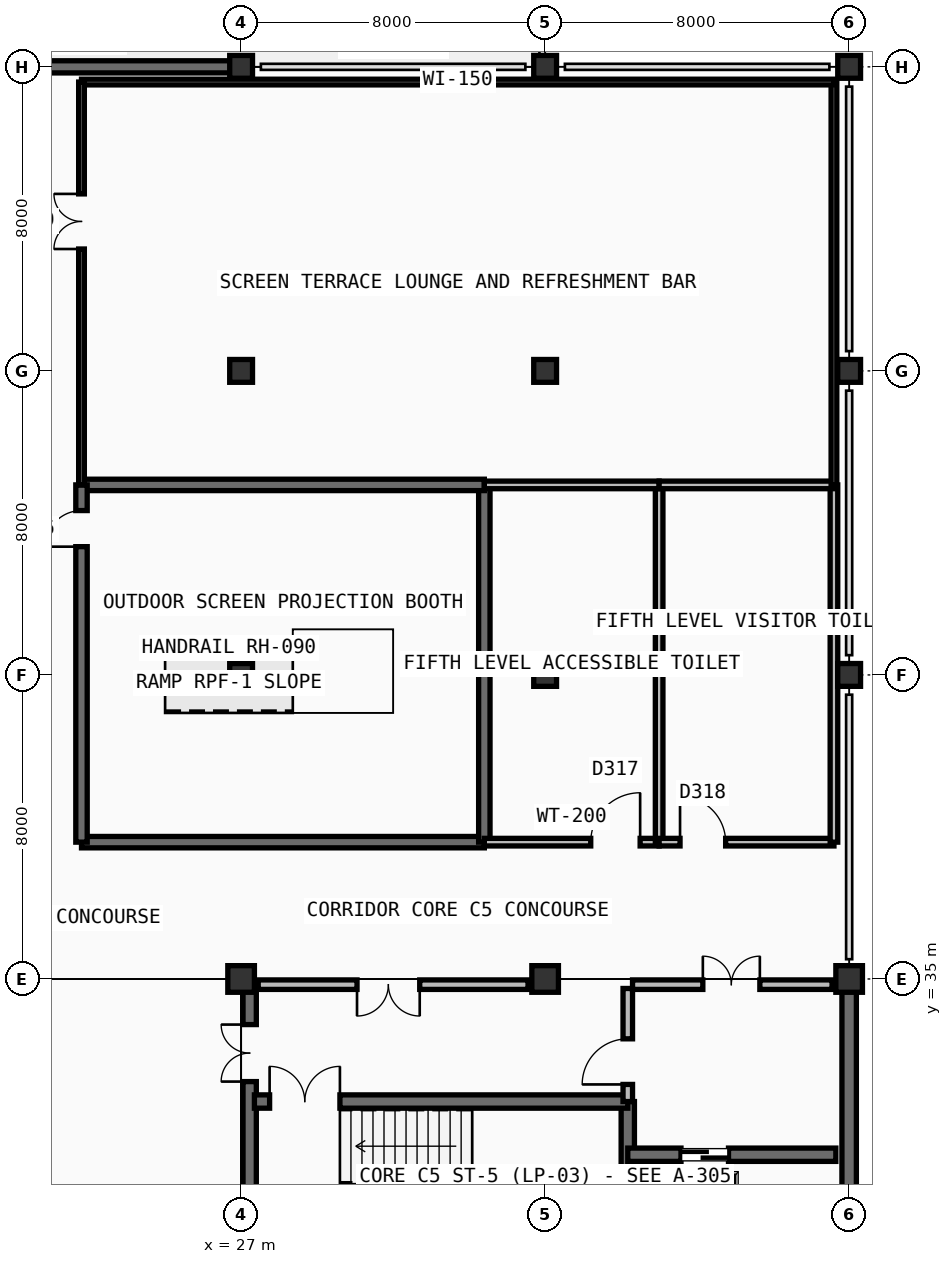
"""IFC4 building model, lengths in metres.
Left out: names, types, materials, properties, quantities, classifications, styles, units other than length and angle.
Written with IfcOpenShell. Run it as: python <this file> out.ifc"""

import sys

from ifc_helpers import new_model, si_unit, direction, frame, frame_2d, origin, origin_2d, place, context, subcontext, project, spatial, rectangle, extrude, element, fill, save


model = new_model("IFC4")
c1 = context("Model", 3, precision=1e-05, world=origin(), true_north=direction((0.0, 1.0)))
c2 = subcontext(c1, "Body", "Model", "MODEL_VIEW")
j1 = project(units=[si_unit("LENGTHUNIT", "METRE"), si_unit("PLANEANGLEUNIT", "RADIAN")], contexts=[c1])
p1 = place(None, origin())
s1 = spatial("IfcSite", under=j1, at=p1, CompositionType="ELEMENT")
p2 = place(p1, origin())
s2 = spatial("IfcBuilding", under=s1, at=p2, CompositionType="ELEMENT")
p3 = place(p2, frame((0.0, 0.0, 23.4)))
s3 = spatial("IfcBuildingStorey", under=s2, at=p3, CompositionType="ELEMENT", Elevation=23.4)
p4 = place(p3, frame((27.0, 35.0, 0.0), z_axis=(0.0, 0.0, 1.0), x_axis=(1.0, 0.0, 0.0)))
e1 = element("IfcColumn", 1, at=p4, inside=s3, PredefinedType="COLUMN", context=c2, shape_type="SweptSolid", body=[
    extrude(rectangle(XDim=0.7, YDim=0.7, at=origin_2d()), origin(), (0.0, 0.0, 1.0), 4.5),
])
for number, where, z_axis, x_axis in (
    (2, (27.0, 43.0, 0.0), (0.0, 0.0, 1.0), (1.0, 0.0, 0.0)),
    (3, (27.0, 51.0, 0.0), (0.0, 0.0, 1.0), (1.0, 0.0, 0.0)),
    (4, (27.0, 59.0, 0.0), (0.0, 0.0, 1.0), (1.0, 0.0, 0.0)),
):
    element("IfcColumn", number, at=place(p3, frame(where, z_axis=z_axis, x_axis=x_axis)), inside=s3, PredefinedType="COLUMN", context=c2, shape_type="SweptSolid", body=[
        extrude(rectangle(XDim=0.6, YDim=0.6, at=origin_2d()), origin(), (0.0, 0.0, 1.0), 4.5),
    ])
p5 = place(p3, frame((35.0, 35.0, 0.0), z_axis=(0.0, 0.0, 1.0), x_axis=(1.0, 0.0, 0.0)))
e5 = element("IfcColumn", 5, at=p5, inside=s3, PredefinedType="COLUMN", context=c2, shape_type="SweptSolid", body=[
    extrude(rectangle(XDim=0.7, YDim=0.7, at=origin_2d()), origin(), (0.0, 0.0, 1.0), 4.5),
])
for number, where, z_axis, x_axis in (
    (6, (35.0, 43.0, 0.0), (0.0, 0.0, 1.0), (1.0, 0.0, 0.0)),
    (7, (35.0, 51.0, 0.0), (0.0, 0.0, 1.0), (1.0, 0.0, 0.0)),
    (8, (35.0, 59.0, 0.0), (0.0, 0.0, 1.0), (1.0, 0.0, 0.0)),
):
    element("IfcColumn", number, at=place(p3, frame(where, z_axis=z_axis, x_axis=x_axis)), inside=s3, PredefinedType="COLUMN", context=c2, shape_type="SweptSolid", body=[
        extrude(rectangle(XDim=0.6, YDim=0.6, at=origin_2d()), origin(), (0.0, 0.0, 1.0), 4.5),
    ])
p6 = place(p3, frame((43.0, 35.0, 0.0), z_axis=(0.0, 0.0, 1.0), x_axis=(1.0, 0.0, 0.0)))
e9 = element("IfcColumn", 9, at=p6, inside=s3, PredefinedType="COLUMN", context=c2, shape_type="SweptSolid", body=[
    extrude(rectangle(XDim=0.7, YDim=0.7, at=origin_2d()), origin(), (0.0, 0.0, 1.0), 4.5),
])
for number, where, z_axis, x_axis in (
    (10, (43.0, 43.0, 0.0), (0.0, 0.0, 1.0), (1.0, 0.0, 0.0)),
    (11, (43.0, 51.0, 0.0), (0.0, 0.0, 1.0), (1.0, 0.0, 0.0)),
    (12, (43.0, 59.0, 0.0), (0.0, 0.0, 1.0), (1.0, 0.0, 0.0)),
):
    element("IfcColumn", number, at=place(p3, frame(where, z_axis=z_axis, x_axis=x_axis)), inside=s3, PredefinedType="COLUMN", context=c2, shape_type="SweptSolid", body=[
        extrude(rectangle(XDim=0.6, YDim=0.6, at=origin_2d()), origin(), (0.0, 0.0, 1.0), 4.5),
    ])
p7 = place(p3, frame((19.0, 59.0, 0.0), z_axis=(0.0, 0.0, 1.0), x_axis=(1.0, 0.0, 0.0)))
e13 = element("IfcWall", 13, at=p7, inside=s3, PredefinedType="SOLIDWALL", context=c2, shape_type="SweptSolid", body=[
    extrude(rectangle(XDim=8.0, YDim=0.32, at=frame_2d((4.0, 0.0))), origin(), (0.0, 0.0, 1.0), 4.5),
])
p8 = place(p7, frame((1.1, 0.0, 0.0)))
e14 = element("IfcOpeningElement", 14, at=p8, cuts=e13, PredefinedType="OPENING", context=c2, shape_type="SweptSolid", body=[
    extrude(rectangle(XDim=1.8, YDim=2.3, at=frame_2d((0.9, 1.15))), frame((0.0, 0.17, 0.0), z_axis=(0.0, -1.0, 0.0), x_axis=(1.0, 0.0, 0.0)), (0.0, 0.0, 1.0), 0.34),
])
p9 = place(p3, frame((43.0, 35.0, 0.0), z_axis=(0.0, 0.0, 1.0), x_axis=(0.0, -1.0, 0.0)))
e15 = element("IfcWall", 15, at=p9, inside=s3, PredefinedType="SOLIDWALL", context=c2, shape_type="SweptSolid", body=[
    extrude(rectangle(XDim=8.0, YDim=0.38, at=frame_2d((4.0, 0.0))), origin(), (0.0, 0.0, 1.0), 4.5),
])
p10 = place(p3, frame((27.225, 27.2, 0.0), z_axis=(0.0, 0.0, 1.0), x_axis=(0.0, 1.0, 0.0)))
e16 = element("IfcWall", 16, at=p10, inside=s3, PredefinedType="SHEAR", context=c2, shape_type="SweptSolid", body=[
    extrude(rectangle(XDim=7.6, YDim=0.35, at=frame_2d((3.8, 0.0))), origin(), (0.0, 0.0, 1.0), 4.1),
])
p11 = place(p10, frame((5.1, 0.0, 0.0)))
e17 = element("IfcOpeningElement", 17, at=p11, cuts=e16, PredefinedType="OPENING", context=c2, shape_type="SweptSolid", body=[
    extrude(rectangle(XDim=1.5, YDim=2.2, at=frame_2d((0.75, 1.1))), frame((0.0, 0.185, 0.0), z_axis=(0.0, -1.0, 0.0), x_axis=(1.0, 0.0, 0.0)), (0.0, 0.0, 1.0), 0.37),
])
p12 = place(p3, frame((37.175, 27.35, 0.0), z_axis=(0.0, 0.0, 1.0), x_axis=(0.0, 1.0, 0.0)))
e18 = element("IfcWall", 18, at=p12, inside=s3, PredefinedType="SHEAR", context=c2, shape_type="SweptSolid", body=[
    extrude(rectangle(XDim=4.425, YDim=0.35, at=frame_2d((2.212, 0.0))), origin(), (0.0, 0.0, 1.0), 4.1),
])
p13 = place(p3, frame((27.35, 31.775, 0.0), z_axis=(0.0, 0.0, 1.0), x_axis=(1.0, 0.0, 0.0)))
e19 = element("IfcWall", 19, at=p13, inside=s3, PredefinedType="SHEAR", context=c2, shape_type="SweptSolid", body=[
    extrude(rectangle(XDim=9.825, YDim=0.35, at=frame_2d((4.913, 0.0))), origin(), (0.0, 0.0, 1.0), 4.1),
])
p14 = place(p13, frame((0.4, 0.0, 0.0)))
e20 = element("IfcOpeningElement", 20, at=p14, cuts=e19, PredefinedType="OPENING", context=c2, shape_type="SweptSolid", body=[
    extrude(rectangle(XDim=1.85, YDim=2.25, at=frame_2d((0.925, 1.125))), frame((0.0, 0.185, 0.0), z_axis=(0.0, -1.0, 0.0), x_axis=(1.0, 0.0, 0.0)), (0.0, 0.0, 1.0), 0.37),
])
p15 = place(p3, frame((37.175, 30.375, 0.0), z_axis=(0.0, 0.0, 1.0), x_axis=(1.0, 0.0, 0.0)))
e21 = element("IfcWall", 21, at=p15, inside=s3, PredefinedType="SHEAR", context=c2, shape_type="SweptSolid", body=[
    extrude(rectangle(XDim=5.475, YDim=0.35, at=frame_2d((2.737, 0.0))), origin(), (0.0, 0.0, 1.0), 4.1),
])
p16 = place(p15, frame((1.4, 0.0, 0.0)))
e22 = element("IfcOpeningElement", 22, at=p16, cuts=e21, PredefinedType="OPENING", context=c2, shape_type="SweptSolid", body=[
    extrude(rectangle(XDim=1.25, YDim=2.25, at=frame_2d((0.625, 1.125))), frame((0.0, 0.185, 0.0), z_axis=(0.0, -1.0, 0.0), x_axis=(1.0, 0.0, 0.0)), (0.0, 0.0, 1.0), 0.37),
])
p17 = place(p3, frame((37.175, 31.775, 0.0), z_axis=(0.0, 0.0, 1.0), x_axis=(0.0, 1.0, 0.0)))
e23 = element("IfcWall", 23, at=p17, inside=s3, PredefinedType="PARTITIONING", context=c2, shape_type="SweptSolid", body=[
    extrude(rectangle(XDim=2.975, YDim=0.25, at=frame_2d((1.488, 0.0))), origin(), (0.0, 0.0, 1.0), 4.1),
])
p18 = place(p17, frame((0.45, 0.0, 0.0)))
e24 = element("IfcOpeningElement", 24, at=p18, cuts=e23, PredefinedType="OPENING", context=c2, shape_type="SweptSolid", body=[
    extrude(rectangle(XDim=1.2, YDim=2.2, at=frame_2d((0.6, 1.1))), frame((0.0, 0.135, 0.0), z_axis=(0.0, -1.0, 0.0), x_axis=(1.0, 0.0, 0.0)), (0.0, 0.0, 1.0), 0.27),
])
p19 = place(p3, frame((27.45, 34.85, 0.0), z_axis=(0.0, 0.0, 1.0), x_axis=(1.0, 0.0, 0.0)))
e25 = element("IfcWall", 25, at=p19, inside=s3, PredefinedType="PARTITIONING", context=c2, shape_type="SweptSolid", body=[
    extrude(rectangle(XDim=7.1, YDim=0.25, at=frame_2d((3.55, 0.0))), origin(), (0.0, 0.0, 1.0), 3.435),
])
p20 = place(p19, frame((2.6, 0.0, 0.0)))
e26 = element("IfcOpeningElement", 26, at=p20, cuts=e25, PredefinedType="OPENING", context=c2, shape_type="SweptSolid", body=[
    extrude(rectangle(XDim=1.65, YDim=2.25, at=frame_2d((0.825, 1.125))), frame((0.0, 0.135, 0.0), z_axis=(0.0, -1.0, 0.0), x_axis=(1.0, 0.0, 0.0)), (0.0, 0.0, 1.0), 0.27),
])
p21 = place(p3, frame((37.3, 34.85, 0.0), z_axis=(0.0, 0.0, 1.0), x_axis=(1.0, 0.0, 0.0)))
e27 = element("IfcWall", 27, at=p21, inside=s3, PredefinedType="PARTITIONING", context=c2, shape_type="SweptSolid", body=[
    extrude(rectangle(XDim=5.25, YDim=0.25, at=frame_2d((2.625, 0.0))), origin(), (0.0, 0.0, 1.0), 3.435),
])
p22 = place(p21, frame((1.85, 0.0, 0.0)))
e28 = element("IfcOpeningElement", 28, at=p22, cuts=e27, PredefinedType="OPENING", context=c2, shape_type="SweptSolid", body=[
    extrude(rectangle(XDim=1.5, YDim=2.2, at=frame_2d((0.75, 1.1))), frame((0.0, 0.135, 0.0), z_axis=(0.0, -1.0, 0.0), x_axis=(1.0, 0.0, 0.0)), (0.0, 0.0, 1.0), 0.27),
])
p23 = place(p3, frame((22.8, 38.6, 0.0), z_axis=(0.0, 0.0, 1.0), x_axis=(1.0, 0.0, 0.0)))
e29 = element("IfcWall", 29, at=p23, inside=s3, PredefinedType="SHEAR", context=c2, shape_type="SweptSolid", body=[
    extrude(rectangle(XDim=10.6, YDim=0.3, at=frame_2d((5.3, 0.0))), origin(), (0.0, 0.0, 1.0), 4.1),
])
p24 = place(p3, frame((33.4, 38.6, 0.0), z_axis=(0.0, 0.0, 1.0), x_axis=(0.0, 1.0, 0.0)))
e30 = element("IfcWall", 30, at=p24, inside=s3, PredefinedType="SHEAR", context=c2, shape_type="SweptSolid", body=[
    extrude(rectangle(XDim=9.4, YDim=0.3, at=frame_2d((4.7, 0.0))), origin(), (0.0, 0.0, 1.0), 4.1),
])
p25 = place(p3, frame((22.8, 48.0, 0.0), z_axis=(0.0, 0.0, 1.0), x_axis=(1.0, 0.0, 0.0)))
e31 = element("IfcWall", 31, at=p25, inside=s3, PredefinedType="SHEAR", context=c2, shape_type="SweptSolid", body=[
    extrude(rectangle(XDim=10.6, YDim=0.3, at=frame_2d((5.3, 0.0))), origin(), (0.0, 0.0, 1.0), 4.1),
])
p26 = place(p3, frame((22.8, 38.6, 0.0), z_axis=(0.0, 0.0, 1.0), x_axis=(0.0, 1.0, 0.0)))
e32 = element("IfcWall", 32, at=p26, inside=s3, PredefinedType="SHEAR", context=c2, shape_type="SweptSolid", body=[
    extrude(rectangle(XDim=9.4, YDim=0.3, at=frame_2d((4.7, 0.0))), origin(), (0.0, 0.0, 1.0), 4.1),
])
p27 = place(p26, frame((7.775, 0.0, 0.0)))
e33 = element("IfcOpeningElement", 33, at=p27, cuts=e32, PredefinedType="OPENING", context=c2, shape_type="SweptSolid", body=[
    extrude(rectangle(XDim=0.95, YDim=2.1, at=frame_2d((0.475, 1.05))), frame((0.0, 0.16, 0.0), z_axis=(0.0, -1.0, 0.0), x_axis=(1.0, 0.0, 0.0)), (0.0, 0.0, 1.0), 0.32),
])
p28 = place(p3, frame((33.4, 38.6, 0.0), z_axis=(0.0, 0.0, 1.0), x_axis=(1.0, 0.0, 0.0)))
e34 = element("IfcWall", 34, at=p28, inside=s3, PredefinedType="PARTITIONING", context=c2, shape_type="SweptSolid", body=[
    extrude(rectangle(XDim=4.6, YDim=0.2, at=frame_2d((2.3, 0.0))), origin(), (0.0, 0.0, 1.0), 4.1),
])
p29 = place(p28, frame((2.8, 0.0, 0.0)))
e35 = element("IfcOpeningElement", 35, at=p29, cuts=e34, PredefinedType="OPENING", context=c2, shape_type="SweptSolid", body=[
    extrude(rectangle(XDim=1.3, YDim=2.2, at=frame_2d((0.65, 1.1))), frame((0.0, 0.11, 0.0), z_axis=(0.0, -1.0, 0.0), x_axis=(1.0, 0.0, 0.0)), (0.0, 0.0, 1.0), 0.22),
])
p30 = place(p3, frame((38.0, 38.6, 0.0), z_axis=(0.0, 0.0, 1.0), x_axis=(0.0, 1.0, 0.0)))
e36 = element("IfcWall", 36, at=p30, inside=s3, PredefinedType="PARTITIONING", context=c2, shape_type="SweptSolid", body=[
    extrude(rectangle(XDim=9.4, YDim=0.2, at=frame_2d((4.7, 0.0))), origin(), (0.0, 0.0, 1.0), 4.1),
])
p31 = place(p3, frame((33.4, 48.0, 0.0), z_axis=(0.0, 0.0, 1.0), x_axis=(1.0, 0.0, 0.0)))
e37 = element("IfcWall", 37, at=p31, inside=s3, PredefinedType="PARTITIONING", context=c2, shape_type="SweptSolid", body=[
    extrude(rectangle(XDim=4.6, YDim=0.2, at=frame_2d((2.3, 0.0))), origin(), (0.0, 0.0, 1.0), 4.1),
])
p32 = place(p3, frame((38.0, 38.6, 0.0), z_axis=(0.0, 0.0, 1.0), x_axis=(1.0, 0.0, 0.0)))
e38 = element("IfcWall", 38, at=p32, inside=s3, PredefinedType="PARTITIONING", context=c2, shape_type="SweptSolid", body=[
    extrude(rectangle(XDim=4.6, YDim=0.2, at=frame_2d((2.3, 0.0))), origin(), (0.0, 0.0, 1.0), 4.1),
])
p33 = place(p32, frame((0.55, 0.0, 0.0)))
e39 = element("IfcOpeningElement", 39, at=p33, cuts=e38, PredefinedType="OPENING", context=c2, shape_type="SweptSolid", body=[
    extrude(rectangle(XDim=1.2, YDim=2.2, at=frame_2d((0.6, 1.1))), frame((0.0, 0.11, 0.0), z_axis=(0.0, -1.0, 0.0), x_axis=(1.0, 0.0, 0.0)), (0.0, 0.0, 1.0), 0.22),
])
p34 = place(p3, frame((42.6, 38.6, 0.0), z_axis=(0.0, 0.0, 1.0), x_axis=(0.0, 1.0, 0.0)))
e40 = element("IfcWall", 40, at=p34, inside=s3, PredefinedType="PARTITIONING", context=c2, shape_type="SweptSolid", body=[
    extrude(rectangle(XDim=9.4, YDim=0.2, at=frame_2d((4.7, 0.0))), origin(), (0.0, 0.0, 1.0), 3.505),
])
p35 = place(p3, frame((38.0, 48.0, 0.0), z_axis=(0.0, 0.0, 1.0), x_axis=(1.0, 0.0, 0.0)))
e41 = element("IfcWall", 41, at=p35, inside=s3, PredefinedType="PARTITIONING", context=c2, shape_type="SweptSolid", body=[
    extrude(rectangle(XDim=4.6, YDim=0.2, at=frame_2d((2.3, 0.0))), origin(), (0.0, 0.0, 1.0), 4.1),
])
p36 = place(p3, frame((42.6, 48.0, 0.0), z_axis=(0.0, 0.0, 1.0), x_axis=(0.0, 1.0, 0.0)))
e42 = element("IfcWall", 42, at=p36, inside=s3, PredefinedType="PARTITIONING", context=c2, shape_type="SweptSolid", body=[
    extrude(rectangle(XDim=10.6, YDim=0.15, at=frame_2d((5.3, 0.0))), origin(), (0.0, 0.0, 1.0), 3.505),
])
p37 = place(p3, frame((22.8, 58.6, 0.0), z_axis=(0.0, 0.0, 1.0), x_axis=(1.0, 0.0, 0.0)))
e43 = element("IfcWall", 43, at=p37, inside=s3, PredefinedType="PARTITIONING", context=c2, shape_type="SweptSolid", body=[
    extrude(rectangle(XDim=19.8, YDim=0.15, at=frame_2d((9.9, 0.0))), origin(), (0.0, 0.0, 1.0), 3.505),
])
p38 = place(p3, frame((22.8, 48.0, 0.0), z_axis=(0.0, 0.0, 1.0), x_axis=(0.0, 1.0, 0.0)))
e44 = element("IfcWall", 44, at=p38, inside=s3, PredefinedType="PARTITIONING", context=c2, shape_type="SweptSolid", body=[
    extrude(rectangle(XDim=10.6, YDim=0.15, at=frame_2d((5.3, 0.0))), origin(), (0.0, 0.0, 1.0), 4.1),
])
p39 = place(p38, frame((6.207, 0.0, 0.0)))
e45 = element("IfcOpeningElement", 45, at=p39, cuts=e44, PredefinedType="OPENING", context=c2, shape_type="SweptSolid", body=[
    extrude(rectangle(XDim=1.45, YDim=2.25, at=frame_2d((0.725, 1.125))), frame((0.0, 0.085, 0.0), z_axis=(0.0, -1.0, 0.0), x_axis=(1.0, 0.0, 0.0)), (0.0, 0.0, 1.0), 0.17),
])
p40 = place(p14, origin())
e46 = element("IfcDoor", 46, at=p40, inside=s3, OperationType="DOUBLE_DOOR_SINGLE_SWING", PredefinedType="DOOR", context=c2, shape_type="SweptSolid", body=[
    extrude(rectangle(XDim=1.85, YDim=2.25, at=frame_2d((0.925, 1.125))), frame((0.0, 0.025, 0.0), z_axis=(0.0, -1.0, 0.0), x_axis=(1.0, 0.0, 0.0)), (0.0, 0.0, 1.0), 0.05),
])
fill(e20, e46)
p41 = place(p16, origin())
e47 = element("IfcDoor", 47, at=p41, inside=s3, OperationType="DOUBLE_DOOR_SLIDING", PredefinedType="DOOR", context=c2, shape_type="SweptSolid", body=[
    extrude(rectangle(XDim=1.25, YDim=2.25, at=frame_2d((0.625, 1.125))), frame((0.0, 0.025, 0.0), z_axis=(0.0, -1.0, 0.0), x_axis=(1.0, 0.0, 0.0)), (0.0, 0.0, 1.0), 0.05),
])
fill(e22, e47)
p42 = place(p18, origin())
e48 = element("IfcDoor", 48, at=p42, inside=s3, OperationType="SINGLE_SWING_LEFT", PredefinedType="DOOR", context=c2, shape_type="SweptSolid", body=[
    extrude(rectangle(XDim=1.2, YDim=2.2, at=frame_2d((0.6, 1.1))), frame((0.0, 0.025, 0.0), z_axis=(0.0, -1.0, 0.0), x_axis=(1.0, 0.0, 0.0)), (0.0, 0.0, 1.0), 0.05),
])
fill(e24, e48)
p43 = place(p20, frame((1.65, 0.0, 0.0), z_axis=(0.0, 0.0, 1.0), x_axis=(-1.0, 0.0, 0.0)))
e49 = element("IfcDoor", 49, at=p43, inside=s3, OperationType="DOUBLE_DOOR_SINGLE_SWING", PredefinedType="DOOR", context=c2, shape_type="SweptSolid", body=[
    extrude(rectangle(XDim=1.65, YDim=2.25, at=frame_2d((0.825, 1.125))), frame((0.0, 0.025, 0.0), z_axis=(0.0, -1.0, 0.0), x_axis=(1.0, 0.0, 0.0)), (0.0, 0.0, 1.0), 0.05),
])
fill(e26, e49)
p44 = place(p22, origin())
e50 = element("IfcDoor", 50, at=p44, inside=s3, OperationType="DOUBLE_DOOR_SINGLE_SWING", PredefinedType="DOOR", context=c2, shape_type="SweptSolid", body=[
    extrude(rectangle(XDim=1.5, YDim=2.2, at=frame_2d((0.75, 1.1))), frame((0.0, 0.025, 0.0), z_axis=(0.0, -1.0, 0.0), x_axis=(1.0, 0.0, 0.0)), (0.0, 0.0, 1.0), 0.05),
])
fill(e28, e50)
p45 = place(p11, origin())
e51 = element("IfcDoor", 51, at=p45, inside=s3, OperationType="DOUBLE_DOOR_SINGLE_SWING", PredefinedType="DOOR", context=c2, shape_type="SweptSolid", body=[
    extrude(rectangle(XDim=1.5, YDim=2.2, at=frame_2d((0.75, 1.1))), frame((0.0, 0.025, 0.0), z_axis=(0.0, -1.0, 0.0), x_axis=(1.0, 0.0, 0.0)), (0.0, 0.0, 1.0), 0.05),
])
fill(e17, e51)
p46 = place(p27, origin())
e52 = element("IfcDoor", 52, at=p46, inside=s3, OperationType="SINGLE_SWING_LEFT", PredefinedType="DOOR", context=c2, shape_type="SweptSolid", body=[
    extrude(rectangle(XDim=0.95, YDim=2.1, at=frame_2d((0.475, 1.05))), frame((0.0, 0.025, 0.0), z_axis=(0.0, -1.0, 0.0), x_axis=(1.0, 0.0, 0.0)), (0.0, 0.0, 1.0), 0.05),
])
fill(e33, e52)
p47 = place(p29, origin())
e53 = element("IfcDoor", 53, at=p47, inside=s3, OperationType="SINGLE_SWING_RIGHT", PredefinedType="DOOR", context=c2, shape_type="SweptSolid", body=[
    extrude(rectangle(XDim=1.3, YDim=2.2, at=frame_2d((0.65, 1.1))), frame((0.0, 0.025, 0.0), z_axis=(0.0, -1.0, 0.0), x_axis=(1.0, 0.0, 0.0)), (0.0, 0.0, 1.0), 0.05),
])
fill(e35, e53)
p48 = place(p33, origin())
e54 = element("IfcDoor", 54, at=p48, inside=s3, OperationType="SINGLE_SWING_LEFT", PredefinedType="DOOR", context=c2, shape_type="SweptSolid", body=[
    extrude(rectangle(XDim=1.2, YDim=2.2, at=frame_2d((0.6, 1.1))), frame((0.0, 0.025, 0.0), z_axis=(0.0, -1.0, 0.0), x_axis=(1.0, 0.0, 0.0)), (0.0, 0.0, 1.0), 0.05),
])
fill(e39, e54)
p49 = place(p39, origin())
e55 = element("IfcDoor", 55, at=p49, inside=s3, OperationType="DOUBLE_DOOR_SINGLE_SWING", PredefinedType="DOOR", context=c2, shape_type="SweptSolid", body=[
    extrude(rectangle(XDim=1.45, YDim=2.25, at=frame_2d((0.725, 1.125))), frame((0.0, 0.025, 0.0), z_axis=(0.0, -1.0, 0.0), x_axis=(1.0, 0.0, 0.0)), (0.0, 0.0, 1.0), 0.05),
])
fill(e45, e55)
save(model, sys.argv[1])
